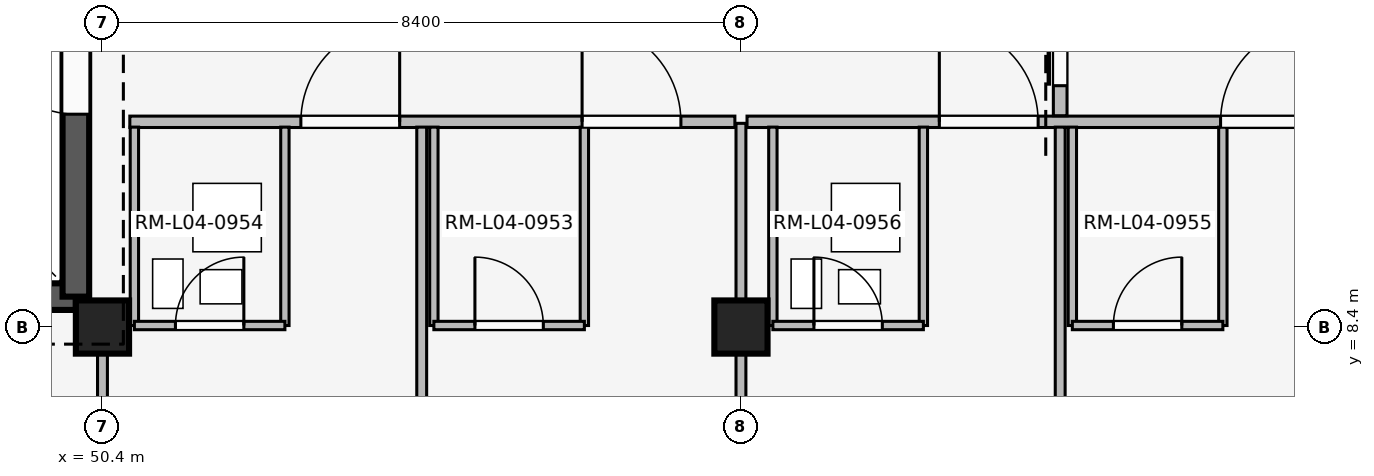
"""IFC4 building model, lengths in metres.
Left out: names, types, materials, properties, quantities, classifications, styles, units other than length and angle.
Written with IfcOpenShell. Run it as: python <this file> out.ifc"""

import sys

from ifc_helpers import new_model, si_unit, direction, frame, frame_2d, origin, origin_2d, place, context, subcontext, project, spatial, rectangle, extrude, element, fill, save


model = new_model("IFC4")
c1 = context("Model", 3, precision=1e-05, world=origin(), true_north=direction((0.0, 1.0)))
c2 = subcontext(c1, "Body", "Model", "MODEL_VIEW")
j1 = project(units=[si_unit("LENGTHUNIT", "METRE"), si_unit("PLANEANGLEUNIT", "RADIAN")], contexts=[c1])
p1 = place(None, origin())
s1 = spatial("IfcSite", under=j1, at=p1, CompositionType="ELEMENT")
p2 = place(p1, origin())
s2 = spatial("IfcBuilding", under=s1, at=p2, CompositionType="ELEMENT")
p3 = place(p2, frame((0.0, 0.0, 16.2)))
s3 = spatial("IfcBuildingStorey", under=s2, at=p3, CompositionType="ELEMENT", Elevation=16.2)
for number, where, z_axis, x_axis in (
    (1, (50.4, 8.4, 0.0), (0.0, 0.0, 1.0), (1.0, 0.0, 0.0)),
    (2, (58.8, 8.4, 0.0), (0.0, 0.0, 1.0), (1.0, 0.0, 0.0)),
):
    element("IfcColumn", number, at=place(p3, frame(where, z_axis=z_axis, x_axis=x_axis)), inside=s3, PredefinedType="COLUMN", context=c2, shape_type="SweptSolid", body=[
        extrude(rectangle(XDim=0.7, YDim=0.7, at=origin_2d()), origin(), (0.0, 0.0, 1.0), 4.2),
    ])
p4 = place(p3, frame((42.55, 8.8, 0.0), z_axis=(0.0, 0.0, 1.0), x_axis=(1.0, 0.0, 0.0)))
e3 = element("IfcWall", 3, at=p4, inside=s3, PredefinedType="SHEAR", context=c2, shape_type="SweptSolid", body=[
    extrude(rectangle(XDim=7.5, YDim=0.35, at=frame_2d((3.75, 0.0))), origin(), (0.0, 0.0, 1.0), 3.92),
])
p5 = place(p4, frame((4.85, 0.0, 0.0)))
e4 = element("IfcOpeningElement", 4, at=p5, cuts=e3, PredefinedType="OPENING", context=c2, shape_type="SweptSolid", body=[
    extrude(rectangle(XDim=1.2, YDim=2.2, at=frame_2d((0.6, 1.1))), frame((0.0, 0.185, 0.0), z_axis=(0.0, -1.0, 0.0), x_axis=(1.0, 0.0, 0.0)), (0.0, 0.0, 1.0), 0.37),
])
p6 = place(p3, frame((50.05, 8.8, 0.0), z_axis=(0.0, 0.0, 1.0), x_axis=(0.0, 1.0, 0.0)))
e5 = element("IfcWall", 5, at=p6, inside=s3, PredefinedType="SHEAR", context=c2, shape_type="SweptSolid", body=[
    extrude(rectangle(XDim=7.55, YDim=0.35, at=frame_2d((3.775, 0.0))), origin(), (0.0, 0.0, 1.0), 3.92),
])
p7 = place(p6, frame((2.4, 0.0, 0.0)))
e6 = element("IfcOpeningElement", 6, at=p7, cuts=e5, PredefinedType="OPENING", context=c2, shape_type="SweptSolid", body=[
    extrude(rectangle(XDim=1.2, YDim=2.2, at=frame_2d((0.6, 1.1))), frame((0.0, 0.185, 0.0), z_axis=(0.0, -1.0, 0.0), x_axis=(1.0, 0.0, 0.0)), (0.0, 0.0, 1.0), 0.37),
])
p8 = place(p3, frame((50.4, 0.14, 0.0), z_axis=(0.0, 0.0, 1.0), x_axis=(0.0, 1.0, 0.0)))
e7 = element("IfcWall", 7, at=p8, inside=s3, PredefinedType="PARTITIONING", context=c2, shape_type="SweptSolid", body=[
    extrude(rectangle(XDim=8.21, YDim=0.13, at=frame_2d((4.105, 0.0))), origin(), (0.0, 0.0, 1.0), 3.3),
])
p9 = place(p8, frame((3.64, 0.0, 0.0)))
e8 = element("IfcOpeningElement", 8, at=p9, cuts=e7, PredefinedType="OPENING", context=c2, shape_type="SweptSolid", body=[
    extrude(rectangle(XDim=1.08, YDim=2.15, at=frame_2d((0.54, 1.075))), frame((0.0, 0.075, 0.0), z_axis=(0.0, -1.0, 0.0), x_axis=(1.0, 0.0, 0.0)), (0.0, 0.0, 1.0), 0.15),
])
p10 = place(p3, frame((50.76, 11.1, 0.0), z_axis=(0.0, 0.0, 1.0), x_axis=(1.0, 0.0, 0.0)))
e9 = element("IfcWall", 9, at=p10, inside=s3, PredefinedType="PARTITIONING", context=c2, shape_type="SweptSolid", body=[
    extrude(rectangle(XDim=7.96, YDim=0.15, at=frame_2d((3.98, 0.0))), origin(), (0.0, 0.0, 1.0), 3.3),
])
p11 = place(p10, frame((2.25, 0.0, 0.0)))
e10 = element("IfcOpeningElement", 10, at=p11, cuts=e9, PredefinedType="OPENING", context=c2, shape_type="SweptSolid", body=[
    extrude(rectangle(XDim=1.3, YDim=2.25, at=frame_2d((0.65, 1.125))), frame((0.0, 0.085, 0.0), z_axis=(0.0, -1.0, 0.0), x_axis=(1.0, 0.0, 0.0)), (0.0, 0.0, 1.0), 0.17),
])
p12 = place(p10, frame((5.95, 0.0, 0.0)))
e11 = element("IfcOpeningElement", 11, at=p12, cuts=e9, PredefinedType="OPENING", context=c2, shape_type="SweptSolid", body=[
    extrude(rectangle(XDim=1.3, YDim=2.25, at=frame_2d((0.65, 1.125))), frame((0.0, 0.085, 0.0), z_axis=(0.0, -1.0, 0.0), x_axis=(1.0, 0.0, 0.0)), (0.0, 0.0, 1.0), 0.17),
])
p13 = place(p3, frame((54.6, 0.1, 0.0), z_axis=(0.0, 0.0, 1.0), x_axis=(0.0, 1.0, 0.0)))
e12 = element("IfcWall", 12, at=p13, inside=s3, PredefinedType="PARTITIONING", context=c2, shape_type="SweptSolid", body=[
    extrude(rectangle(XDim=10.93, YDim=0.13, at=frame_2d((5.465, 0.0))), origin(), (0.0, 0.0, 1.0), 3.3),
])
for number, where, z_axis, x_axis in (
    (13, (50.82, 8.42, 0.0), (0.0, 0.0, 1.0), (0.0, 1.0, 0.0)),
    (14, (52.8, 8.42, 0.0), (0.0, 0.0, 1.0), (0.0, 1.0, 0.0)),
):
    element("IfcWall", number, at=place(p3, frame(where, z_axis=z_axis, x_axis=x_axis)), inside=s3, PredefinedType="PARTITIONING", context=c2, shape_type="SweptSolid", body=[
        extrude(rectangle(XDim=2.61, YDim=0.11, at=frame_2d((1.305, 0.0))), origin(), (0.0, 0.0, 1.0), 3.3),
    ])
p14 = place(p3, frame((50.82, 8.42, 0.0), z_axis=(0.0, 0.0, 1.0), x_axis=(1.0, 0.0, 0.0)))
e15 = element("IfcWall", 15, at=p14, inside=s3, PredefinedType="PARTITIONING", context=c2, shape_type="SweptSolid", body=[
    extrude(rectangle(XDim=1.98, YDim=0.11, at=frame_2d((0.99, 0.0))), origin(), (0.0, 0.0, 1.0), 3.3),
])
p15 = place(p14, frame((0.54, 0.0, 0.0)))
e16 = element("IfcOpeningElement", 16, at=p15, cuts=e15, PredefinedType="OPENING", context=c2, shape_type="SweptSolid", body=[
    extrude(rectangle(XDim=0.9, YDim=2.1, at=frame_2d((0.45, 1.05))), frame((0.0, 0.065, 0.0), z_axis=(0.0, -1.0, 0.0), x_axis=(1.0, 0.0, 0.0)), (0.0, 0.0, 1.0), 0.13),
])
for number, where, z_axis, x_axis in (
    (17, (54.76, 8.42, 0.0), (0.0, 0.0, 1.0), (0.0, 1.0, 0.0)),
    (18, (56.74, 8.42, 0.0), (0.0, 0.0, 1.0), (0.0, 1.0, 0.0)),
):
    element("IfcWall", number, at=place(p3, frame(where, z_axis=z_axis, x_axis=x_axis)), inside=s3, PredefinedType="PARTITIONING", context=c2, shape_type="SweptSolid", body=[
        extrude(rectangle(XDim=2.61, YDim=0.11, at=frame_2d((1.305, 0.0))), origin(), (0.0, 0.0, 1.0), 3.3),
    ])
p16 = place(p3, frame((54.76, 8.42, 0.0), z_axis=(0.0, 0.0, 1.0), x_axis=(1.0, 0.0, 0.0)))
e19 = element("IfcWall", 19, at=p16, inside=s3, PredefinedType="PARTITIONING", context=c2, shape_type="SweptSolid", body=[
    extrude(rectangle(XDim=1.98, YDim=0.11, at=frame_2d((0.99, 0.0))), origin(), (0.0, 0.0, 1.0), 3.3),
])
p17 = place(p16, frame((0.54, 0.0, 0.0)))
e20 = element("IfcOpeningElement", 20, at=p17, cuts=e19, PredefinedType="OPENING", context=c2, shape_type="SweptSolid", body=[
    extrude(rectangle(XDim=0.9, YDim=2.1, at=frame_2d((0.45, 1.05))), frame((0.0, 0.065, 0.0), z_axis=(0.0, -1.0, 0.0), x_axis=(1.0, 0.0, 0.0)), (0.0, 0.0, 1.0), 0.13),
])
p18 = place(p3, frame((58.8, 0.14, 0.0), z_axis=(0.0, 0.0, 1.0), x_axis=(0.0, 1.0, 0.0)))
e21 = element("IfcWall", 21, at=p18, inside=s3, PredefinedType="PARTITIONING", context=c2, shape_type="SweptSolid", body=[
    extrude(rectangle(XDim=10.94, YDim=0.13, at=frame_2d((5.47, 0.0))), origin(), (0.0, 0.0, 1.0), 3.3),
])
p19 = place(p3, frame((58.88, 11.1, 0.0), z_axis=(0.0, 0.0, 1.0), x_axis=(1.0, 0.0, 0.0)))
e22 = element("IfcWall", 22, at=p19, inside=s3, PredefinedType="PARTITIONING", context=c2, shape_type="SweptSolid", body=[
    extrude(rectangle(XDim=8.24, YDim=0.15, at=frame_2d((4.12, 0.0))), origin(), (0.0, 0.0, 1.0), 3.3),
])
p20 = place(p19, frame((2.53, 0.0, 0.0)))
e23 = element("IfcOpeningElement", 23, at=p20, cuts=e22, PredefinedType="OPENING", context=c2, shape_type="SweptSolid", body=[
    extrude(rectangle(XDim=1.3, YDim=2.25, at=frame_2d((0.65, 1.125))), frame((0.0, 0.085, 0.0), z_axis=(0.0, -1.0, 0.0), x_axis=(1.0, 0.0, 0.0)), (0.0, 0.0, 1.0), 0.17),
])
p21 = place(p19, frame((6.23, 0.0, 0.0)))
e24 = element("IfcOpeningElement", 24, at=p21, cuts=e22, PredefinedType="OPENING", context=c2, shape_type="SweptSolid", body=[
    extrude(rectangle(XDim=1.3, YDim=2.25, at=frame_2d((0.65, 1.125))), frame((0.0, 0.085, 0.0), z_axis=(0.0, -1.0, 0.0), x_axis=(1.0, 0.0, 0.0)), (0.0, 0.0, 1.0), 0.17),
])
p22 = place(p3, frame((63.0, 0.1, 0.0), z_axis=(0.0, 0.0, 1.0), x_axis=(0.0, 1.0, 0.0)))
e25 = element("IfcWall", 25, at=p22, inside=s3, PredefinedType="PARTITIONING", context=c2, shape_type="SweptSolid", body=[
    extrude(rectangle(XDim=10.93, YDim=0.13, at=frame_2d((5.465, 0.0))), origin(), (0.0, 0.0, 1.0), 3.3),
])
for number, where, z_axis, x_axis in (
    (26, (59.22, 8.42, 0.0), (0.0, 0.0, 1.0), (0.0, 1.0, 0.0)),
    (27, (61.2, 8.42, 0.0), (0.0, 0.0, 1.0), (0.0, 1.0, 0.0)),
):
    element("IfcWall", number, at=place(p3, frame(where, z_axis=z_axis, x_axis=x_axis)), inside=s3, PredefinedType="PARTITIONING", context=c2, shape_type="SweptSolid", body=[
        extrude(rectangle(XDim=2.61, YDim=0.11, at=frame_2d((1.305, 0.0))), origin(), (0.0, 0.0, 1.0), 3.3),
    ])
p23 = place(p3, frame((59.22, 8.42, 0.0), z_axis=(0.0, 0.0, 1.0), x_axis=(1.0, 0.0, 0.0)))
e28 = element("IfcWall", 28, at=p23, inside=s3, PredefinedType="PARTITIONING", context=c2, shape_type="SweptSolid", body=[
    extrude(rectangle(XDim=1.98, YDim=0.11, at=frame_2d((0.99, 0.0))), origin(), (0.0, 0.0, 1.0), 3.3),
])
p24 = place(p23, frame((0.54, 0.0, 0.0)))
e29 = element("IfcOpeningElement", 29, at=p24, cuts=e28, PredefinedType="OPENING", context=c2, shape_type="SweptSolid", body=[
    extrude(rectangle(XDim=0.9, YDim=2.1, at=frame_2d((0.45, 1.05))), frame((0.0, 0.065, 0.0), z_axis=(0.0, -1.0, 0.0), x_axis=(1.0, 0.0, 0.0)), (0.0, 0.0, 1.0), 0.13),
])
for number, where, z_axis, x_axis in (
    (30, (63.16, 8.42, 0.0), (0.0, 0.0, 1.0), (0.0, 1.0, 0.0)),
    (31, (65.14, 8.42, 0.0), (0.0, 0.0, 1.0), (0.0, 1.0, 0.0)),
):
    element("IfcWall", number, at=place(p3, frame(where, z_axis=z_axis, x_axis=x_axis)), inside=s3, PredefinedType="PARTITIONING", context=c2, shape_type="SweptSolid", body=[
        extrude(rectangle(XDim=2.61, YDim=0.11, at=frame_2d((1.305, 0.0))), origin(), (0.0, 0.0, 1.0), 3.3),
    ])
p25 = place(p3, frame((63.16, 8.42, 0.0), z_axis=(0.0, 0.0, 1.0), x_axis=(1.0, 0.0, 0.0)))
e32 = element("IfcWall", 32, at=p25, inside=s3, PredefinedType="PARTITIONING", context=c2, shape_type="SweptSolid", body=[
    extrude(rectangle(XDim=1.98, YDim=0.11, at=frame_2d((0.99, 0.0))), origin(), (0.0, 0.0, 1.0), 3.3),
])
p26 = place(p25, frame((0.54, 0.0, 0.0)))
e33 = element("IfcOpeningElement", 33, at=p26, cuts=e32, PredefinedType="OPENING", context=c2, shape_type="SweptSolid", body=[
    extrude(rectangle(XDim=0.9, YDim=2.1, at=frame_2d((0.45, 1.05))), frame((0.0, 0.065, 0.0), z_axis=(0.0, -1.0, 0.0), x_axis=(1.0, 0.0, 0.0)), (0.0, 0.0, 1.0), 0.13),
])
p27 = place(p3, frame((63.0, 11.18, 0.0), z_axis=(0.0, 0.0, 1.0), x_axis=(0.0, 1.0, 0.0)))
e34 = element("IfcWall", 34, at=p27, inside=s3, PredefinedType="PARTITIONING", context=c2, shape_type="SweptSolid", body=[
    extrude(rectangle(XDim=2.84, YDim=0.18, at=frame_2d((1.42, 0.0))), origin(), (0.0, 0.0, 1.0), 3.3),
])
p28 = place(p27, frame((0.395, 0.0, 0.0)))
e35 = element("IfcOpeningElement", 35, at=p28, cuts=e34, PredefinedType="OPENING", context=c2, shape_type="SweptSolid", body=[
    extrude(rectangle(XDim=2.05, YDim=2.35, at=frame_2d((1.025, 1.175))), frame((0.0, 0.1, 0.0), z_axis=(0.0, -1.0, 0.0), x_axis=(1.0, 0.0, 0.0)), (0.0, 0.0, 1.0), 0.2),
])
p29 = place(p7, origin())
e36 = element("IfcDoor", 36, at=p29, inside=s3, OperationType="SINGLE_SWING_RIGHT", PredefinedType="DOOR", context=c2, shape_type="SweptSolid", body=[
    extrude(rectangle(XDim=1.2, YDim=2.2, at=frame_2d((0.6, 1.1))), frame((0.0, 0.025, 0.0), z_axis=(0.0, -1.0, 0.0), x_axis=(1.0, 0.0, 0.0)), (0.0, 0.0, 1.0), 0.05),
])
fill(e6, e36)
p30 = place(p11, origin())
e37 = element("IfcDoor", 37, at=p30, inside=s3, OperationType="SINGLE_SWING_RIGHT", PredefinedType="DOOR", context=c2, shape_type="SweptSolid", body=[
    extrude(rectangle(XDim=1.3, YDim=2.25, at=frame_2d((0.65, 1.125))), frame((0.0, 0.025, 0.0), z_axis=(0.0, -1.0, 0.0), x_axis=(1.0, 0.0, 0.0)), (0.0, 0.0, 1.0), 0.05),
])
fill(e10, e37)
p31 = place(p12, origin())
e38 = element("IfcDoor", 38, at=p31, inside=s3, OperationType="SINGLE_SWING_LEFT", PredefinedType="DOOR", context=c2, shape_type="SweptSolid", body=[
    extrude(rectangle(XDim=1.3, YDim=2.25, at=frame_2d((0.65, 1.125))), frame((0.0, 0.025, 0.0), z_axis=(0.0, -1.0, 0.0), x_axis=(1.0, 0.0, 0.0)), (0.0, 0.0, 1.0), 0.05),
])
fill(e11, e38)
p32 = place(p15, origin())
e39 = element("IfcDoor", 39, at=p32, inside=s3, OperationType="SINGLE_SWING_RIGHT", PredefinedType="DOOR", context=c2, shape_type="SweptSolid", body=[
    extrude(rectangle(XDim=0.9, YDim=2.1, at=frame_2d((0.45, 1.05))), frame((0.0, 0.025, 0.0), z_axis=(0.0, -1.0, 0.0), x_axis=(1.0, 0.0, 0.0)), (0.0, 0.0, 1.0), 0.05),
])
fill(e16, e39)
p33 = place(p17, origin())
e40 = element("IfcDoor", 40, at=p33, inside=s3, OperationType="SINGLE_SWING_LEFT", PredefinedType="DOOR", context=c2, shape_type="SweptSolid", body=[
    extrude(rectangle(XDim=0.9, YDim=2.1, at=frame_2d((0.45, 1.05))), frame((0.0, 0.025, 0.0), z_axis=(0.0, -1.0, 0.0), x_axis=(1.0, 0.0, 0.0)), (0.0, 0.0, 1.0), 0.05),
])
fill(e20, e40)
p34 = place(p20, origin())
e41 = element("IfcDoor", 41, at=p34, inside=s3, OperationType="SINGLE_SWING_LEFT", PredefinedType="DOOR", context=c2, shape_type="SweptSolid", body=[
    extrude(rectangle(XDim=1.3, YDim=2.25, at=frame_2d((0.65, 1.125))), frame((0.0, 0.025, 0.0), z_axis=(0.0, -1.0, 0.0), x_axis=(1.0, 0.0, 0.0)), (0.0, 0.0, 1.0), 0.05),
])
fill(e23, e41)
p35 = place(p21, origin())
e42 = element("IfcDoor", 42, at=p35, inside=s3, OperationType="SINGLE_SWING_RIGHT", PredefinedType="DOOR", context=c2, shape_type="SweptSolid", body=[
    extrude(rectangle(XDim=1.3, YDim=2.25, at=frame_2d((0.65, 1.125))), frame((0.0, 0.025, 0.0), z_axis=(0.0, -1.0, 0.0), x_axis=(1.0, 0.0, 0.0)), (0.0, 0.0, 1.0), 0.05),
])
fill(e24, e42)
p36 = place(p24, origin())
e43 = element("IfcDoor", 43, at=p36, inside=s3, OperationType="SINGLE_SWING_LEFT", PredefinedType="DOOR", context=c2, shape_type="SweptSolid", body=[
    extrude(rectangle(XDim=0.9, YDim=2.1, at=frame_2d((0.45, 1.05))), frame((0.0, 0.025, 0.0), z_axis=(0.0, -1.0, 0.0), x_axis=(1.0, 0.0, 0.0)), (0.0, 0.0, 1.0), 0.05),
])
fill(e29, e43)
p37 = place(p26, origin())
e44 = element("IfcDoor", 44, at=p37, inside=s3, OperationType="SINGLE_SWING_RIGHT", PredefinedType="DOOR", context=c2, shape_type="SweptSolid", body=[
    extrude(rectangle(XDim=0.9, YDim=2.1, at=frame_2d((0.45, 1.05))), frame((0.0, 0.025, 0.0), z_axis=(0.0, -1.0, 0.0), x_axis=(1.0, 0.0, 0.0)), (0.0, 0.0, 1.0), 0.05),
])
fill(e33, e44)
p38 = place(p28, origin())
e45 = element("IfcDoor", 45, at=p38, inside=s3, OperationType="SLIDING_TO_LEFT", PredefinedType="DOOR", context=c2, shape_type="SweptSolid", body=[
    extrude(rectangle(XDim=2.05, YDim=2.35, at=frame_2d((1.025, 1.175))), frame((0.0, 0.025, 0.0), z_axis=(0.0, -1.0, 0.0), x_axis=(1.0, 0.0, 0.0)), (0.0, 0.0, 1.0), 0.05),
])
fill(e35, e45)
save(model, sys.argv[1])
